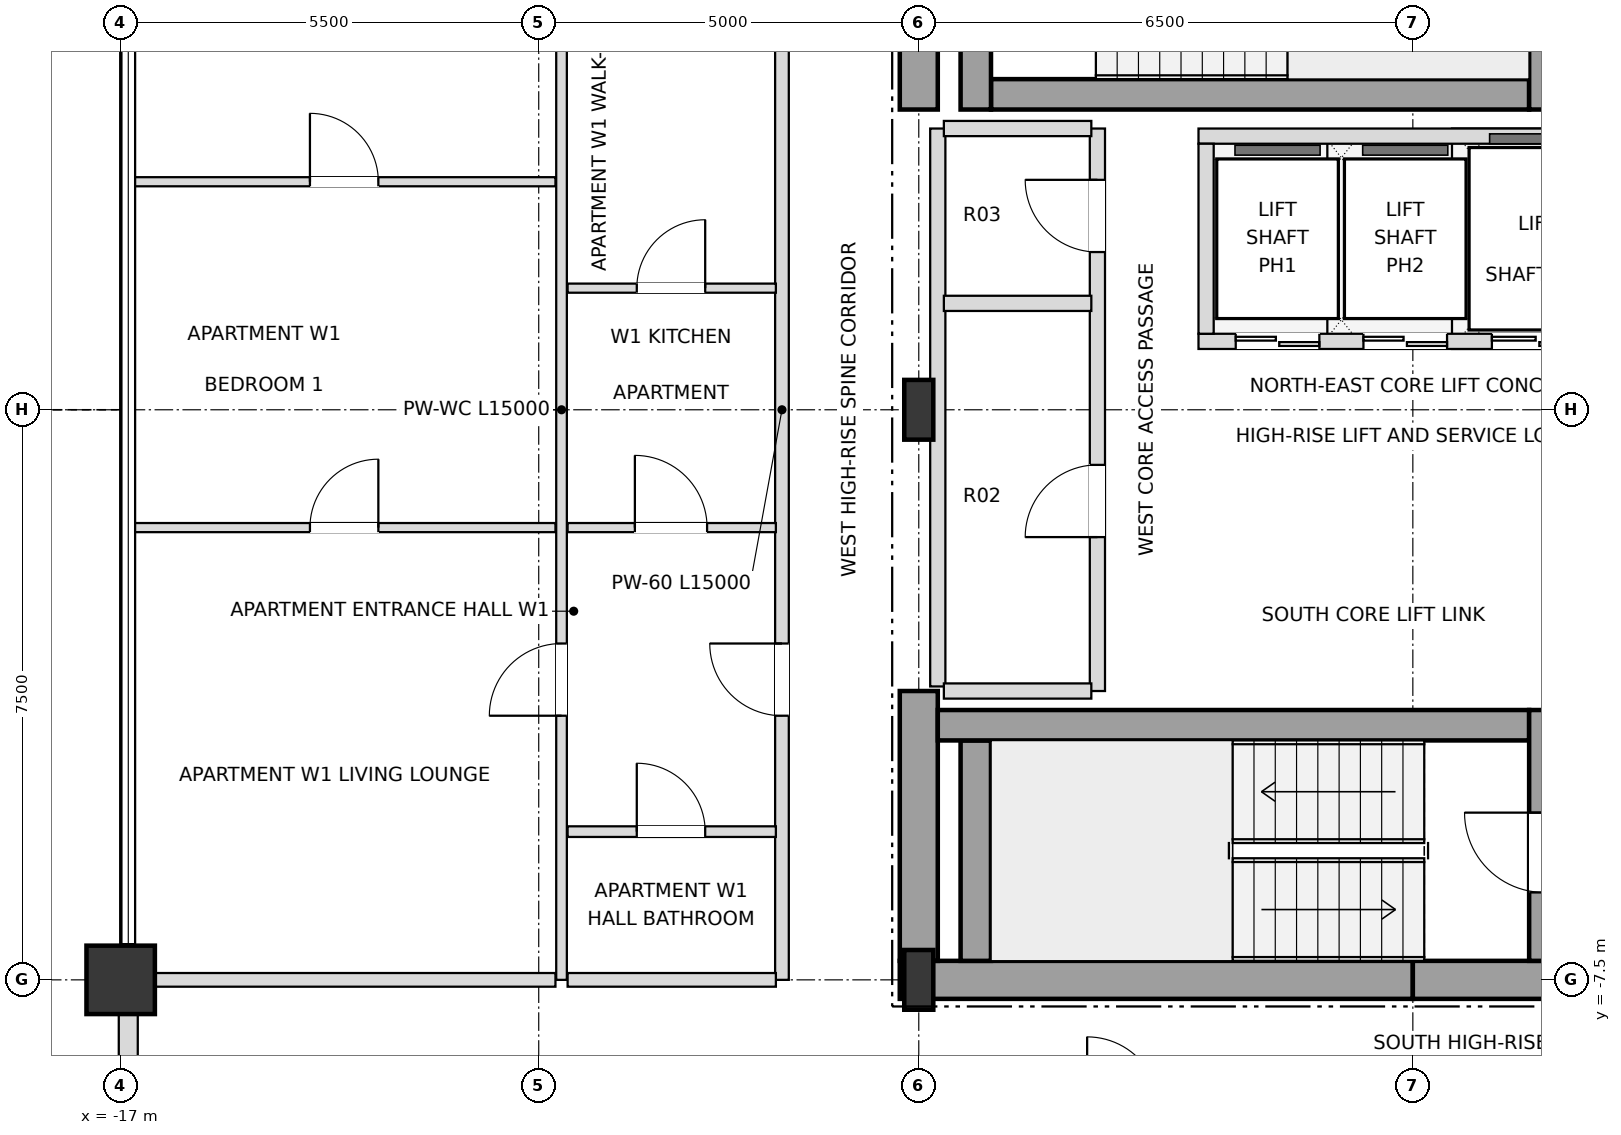
"""IFC4 building model, lengths in metres.
Left out: names, types, materials, properties, quantities, classifications, styles, units other than length and angle.
Written with IfcOpenShell. Run it as: python <this file> out.ifc"""

import sys

from ifc_helpers import new_model, si_unit, direction, frame, frame_2d, origin, origin_2d, place, context, subcontext, project, spatial, rectangle, i_section, extrude, element, fill, save


model = new_model("IFC4")
c1 = context("Model", 3, precision=1e-05, world=origin(), true_north=direction((0.0, 1.0)))
c2 = subcontext(c1, "Body", "Model", "MODEL_VIEW")
j1 = project(units=[si_unit("LENGTHUNIT", "METRE"), si_unit("PLANEANGLEUNIT", "RADIAN")], contexts=[c1])
p1 = place(None, origin())
s1 = spatial("IfcSite", under=j1, at=p1, CompositionType="ELEMENT")
p2 = place(p1, origin())
s2 = spatial("IfcBuilding", under=s1, at=p2, CompositionType="ELEMENT")
p3 = place(p2, frame((0.0, 0.0, 251.1)))
s3 = spatial("IfcBuildingStorey", under=s2, at=p3, CompositionType="ELEMENT", Elevation=251.1)
for number, where, z_axis, x_axis in (
    (1, (-6.5, -7.5, 0.0), (0.0, 0.0, 1.0), (1.0, 0.0, 0.0)),
    (2, (-6.5, 0.0, 0.0), (0.0, 0.0, 1.0), (1.0, 0.0, 0.0)),
):
    element("IfcColumn", number, at=place(p3, frame(where, z_axis=z_axis, x_axis=x_axis)), inside=s3, PredefinedType="COLUMN", context=c2, shape_type="SweptSolid", body=[
        extrude(i_section(OverallWidth=0.382, OverallDepth=0.786, WebThickness=0.02, FlangeThickness=0.033, at=origin_2d()), origin(), (0.0, 0.0, 1.0), 3.6),
    ])
p4 = place(p3, frame((-17.0, -7.5, 0.0), z_axis=(0.0, 0.0, 1.0), x_axis=(1.0, 0.0, 0.0)))
e3 = element("IfcColumn", 3, at=p4, inside=s3, PredefinedType="USERDEFINED", context=c2, shape_type="SweptSolid", body=[
    extrude(rectangle(XDim=0.9, YDim=0.9, at=origin_2d()), origin(), (0.0, 0.0, 1.0), 3.6),
])
p5 = place(p3, frame((-16.9, -7.945, 0.0), z_axis=(0.0, 0.0, 1.0), x_axis=(0.0, -1.0, 0.0)))
e4 = element("IfcWall", 4, at=p5, inside=s3, PredefinedType="SOLIDWALL", context=c2, shape_type="SweptSolid", body=[
    extrude(rectangle(XDim=4.61, YDim=0.25, at=frame_2d((2.305, 0.0))), origin(), (0.0, 0.0, 1.0), 2.748),
])
p6 = place(p5, frame((1.405, 0.0, 0.72)))
e5 = element("IfcOpeningElement", 5, at=p6, cuts=e4, PredefinedType="OPENING", context=c2, shape_type="SweptSolid", body=[
    extrude(rectangle(XDim=1.8, YDim=1.68, at=frame_2d((0.9, 0.84))), frame((0.0, 0.135, 0.0), z_axis=(0.0, -1.0, 0.0), x_axis=(1.0, 0.0, 0.0)), (0.0, 0.0, 1.0), 0.27),
])
for number, where, z_axis, x_axis in (
    (6, (-6.75, -7.5, 0.0), (0.0, 0.0, 1.0), (1.0, 0.0, 0.0)),
    (7, (0.0, -7.5, 0.0), (0.0, 0.0, 1.0), (1.0, 0.0, 0.0)),
):
    element("IfcWall", number, at=place(p3, frame(where, z_axis=z_axis, x_axis=x_axis)), inside=s3, PredefinedType="SHEAR", context=c2, shape_type="SweptSolid", body=[
        extrude(rectangle(XDim=6.75, YDim=0.5, at=frame_2d((3.375, 0.0))), origin(), (0.0, 0.0, 1.0), 3.38),
    ])
p7 = place(p3, frame((-6.5, -7.25, 0.0), z_axis=(0.0, 0.0, 1.0), x_axis=(0.0, 1.0, 0.0)))
e8 = element("IfcWall", 8, at=p7, inside=s3, PredefinedType="SHEAR", context=c2, shape_type="SweptSolid", body=[
    extrude(rectangle(XDim=3.55, YDim=0.5, at=frame_2d((1.775, 0.0))), origin(), (0.0, 0.0, 1.0), 3.38),
])
p8 = place(p3, frame((-6.5, 3.95, 0.0), z_axis=(0.0, 0.0, 1.0), x_axis=(0.0, 1.0, 0.0)))
e9 = element("IfcWall", 9, at=p8, inside=s3, PredefinedType="SHEAR", context=c2, shape_type="SweptSolid", body=[
    extrude(rectangle(XDim=3.3, YDim=0.5, at=frame_2d((1.65, 0.0))), origin(), (0.0, 0.0, 1.0), 3.38),
])
p9 = place(p3, frame((-5.75, -7.25, 0.0), z_axis=(0.0, 0.0, 1.0), x_axis=(0.0, 1.0, 0.0)))
e10 = element("IfcWall", 10, at=p9, inside=s3, PredefinedType="SHEAR", context=c2, shape_type="SweptSolid", body=[
    extrude(rectangle(XDim=2.9, YDim=0.4, at=frame_2d((1.45, 0.0))), origin(), (0.0, 0.0, 1.0), 3.38),
])
p10 = place(p3, frame((-6.25, -4.15, 0.0), z_axis=(0.0, 0.0, 1.0), x_axis=(1.0, 0.0, 0.0)))
e11 = element("IfcWall", 11, at=p10, inside=s3, PredefinedType="SHEAR", context=c2, shape_type="SweptSolid", body=[
    extrude(rectangle(XDim=7.78, YDim=0.4, at=frame_2d((3.89, 0.0))), origin(), (0.0, 0.0, 1.0), 3.38),
])
p11 = place(p3, frame((1.73, -7.25, 0.0), z_axis=(0.0, 0.0, 1.0), x_axis=(0.0, 1.0, 0.0)))
e12 = element("IfcWall", 12, at=p11, inside=s3, PredefinedType="SHEAR", context=c2, shape_type="SweptSolid", body=[
    extrude(rectangle(XDim=3.3, YDim=0.4, at=frame_2d((1.65, 0.0))), origin(), (0.0, 0.0, 1.0), 3.38),
])
p12 = place(p11, frame((0.9, 0.0, 0.0)))
e13 = element("IfcOpeningElement", 13, at=p12, cuts=e12, PredefinedType="OPENING", context=c2, shape_type="SweptSolid", body=[
    extrude(rectangle(XDim=1.05, YDim=2.15, at=frame_2d((0.525, 1.075))), frame((0.0, 0.21, 0.0), z_axis=(0.0, -1.0, 0.0), x_axis=(1.0, 0.0, 0.0)), (0.0, 0.0, 1.0), 0.42),
])
p13 = place(p3, frame((-5.55, 4.15, 0.0), z_axis=(0.0, 0.0, 1.0), x_axis=(1.0, 0.0, 0.0)))
e14 = element("IfcWall", 14, at=p13, inside=s3, PredefinedType="SHEAR", context=c2, shape_type="SweptSolid", body=[
    extrude(rectangle(XDim=7.08, YDim=0.4, at=frame_2d((3.54, 0.0))), origin(), (0.0, 0.0, 1.0), 3.38),
])
for number, where, z_axis, x_axis in (
    (15, (1.73, 3.95, 0.0), (0.0, 0.0, 1.0), (0.0, 1.0, 0.0)),
    (16, (-5.75, 3.95, 0.0), (0.0, 0.0, 1.0), (0.0, 1.0, 0.0)),
):
    element("IfcWall", number, at=place(p3, frame(where, z_axis=z_axis, x_axis=x_axis)), inside=s3, PredefinedType="SHEAR", context=c2, shape_type="SweptSolid", body=[
        extrude(rectangle(XDim=3.3, YDim=0.4, at=frame_2d((1.65, 0.0))), origin(), (0.0, 0.0, 1.0), 3.38),
    ])
p14 = place(p3, frame((-2.82, 0.9, 0.0), z_axis=(0.0, 0.0, 1.0), x_axis=(1.0, 0.0, 0.0)))
e17 = element("IfcWall", 17, at=p14, inside=s3, PredefinedType="SOLIDWALL", context=c2, shape_type="SweptSolid", body=[
    extrude(rectangle(XDim=5.58, YDim=0.2, at=frame_2d((2.79, 0.0))), origin(), (0.0, 0.0, 1.0), 3.38),
])
p15 = place(p14, frame((0.49, 0.0, 0.0)))
e18 = element("IfcOpeningElement", 18, at=p15, cuts=e17, PredefinedType="OPENING", context=c2, shape_type="SweptSolid", body=[
    extrude(rectangle(XDim=1.1, YDim=2.15, at=frame_2d((0.55, 1.075))), frame((0.0, 0.11, 0.0), z_axis=(0.0, -1.0, 0.0), x_axis=(1.0, 0.0, 0.0)), (0.0, 0.0, 1.0), 0.22),
])
p16 = place(p14, frame((2.17, 0.0, 0.0)))
e19 = element("IfcOpeningElement", 19, at=p16, cuts=e17, PredefinedType="OPENING", context=c2, shape_type="SweptSolid", body=[
    extrude(rectangle(XDim=1.1, YDim=2.15, at=frame_2d((0.55, 1.075))), frame((0.0, 0.11, 0.0), z_axis=(0.0, -1.0, 0.0), x_axis=(1.0, 0.0, 0.0)), (0.0, 0.0, 1.0), 0.22),
])
p17 = place(p14, frame((3.86, 0.0, 0.0)))
e20 = element("IfcOpeningElement", 20, at=p17, cuts=e17, PredefinedType="OPENING", context=c2, shape_type="SweptSolid", body=[
    extrude(rectangle(XDim=1.2, YDim=2.2, at=frame_2d((0.6, 1.1))), frame((0.0, 0.11, 0.0), z_axis=(0.0, -1.0, 0.0), x_axis=(1.0, 0.0, 0.0)), (0.0, 0.0, 1.0), 0.22),
])
p18 = place(p3, frame((-2.82, 3.6, 0.0), z_axis=(0.0, 0.0, 1.0), x_axis=(1.0, 0.0, 0.0)))
e21 = element("IfcWall", 21, at=p18, inside=s3, PredefinedType="SOLIDWALL", context=c2, shape_type="SweptSolid", body=[
    extrude(rectangle(XDim=5.58, YDim=0.2, at=frame_2d((2.79, 0.0))), origin(), (0.0, 0.0, 1.0), 3.38),
])
p19 = place(p3, frame((-2.72, 1.0, 0.0), z_axis=(0.0, 0.0, 1.0), x_axis=(0.0, 1.0, 0.0)))
e22 = element("IfcWall", 22, at=p19, inside=s3, PredefinedType="SOLIDWALL", context=c2, shape_type="SweptSolid", body=[
    extrude(rectangle(XDim=2.5, YDim=0.2, at=frame_2d((1.25, 0.0))), origin(), (0.0, 0.0, 1.0), 3.38),
])
p20 = place(p3, frame((-11.2, -7.5, 0.0), z_axis=(0.0, 0.0, 1.0), x_axis=(0.0, 1.0, 0.0)))
e23 = element("IfcWall", 23, at=p20, inside=s3, PredefinedType="PARTITIONING", context=c2, shape_type="SweptSolid", body=[
    extrude(rectangle(XDim=15.0, YDim=0.14, at=frame_2d((7.5, 0.0))), origin(), (0.0, 0.0, 1.0), 3.38),
])
p21 = place(p20, frame((3.475, 0.0, 0.0)))
e24 = element("IfcOpeningElement", 24, at=p21, cuts=e23, PredefinedType="OPENING", context=c2, shape_type="SweptSolid", body=[
    extrude(rectangle(XDim=0.95, YDim=2.1, at=frame_2d((0.475, 1.05))), frame((0.0, 0.08, 0.0), z_axis=(0.0, -1.0, 0.0), x_axis=(1.0, 0.0, 0.0)), (0.0, 0.0, 1.0), 0.16),
])
p22 = place(p3, frame((-8.3, -7.5, 0.0), z_axis=(0.0, 0.0, 1.0), x_axis=(0.0, 1.0, 0.0)))
e25 = element("IfcWall", 25, at=p22, inside=s3, PredefinedType="PARTITIONING", context=c2, shape_type="SweptSolid", body=[
    extrude(rectangle(XDim=15.0, YDim=0.18, at=frame_2d((7.5, 0.0))), origin(), (0.0, 0.0, 1.0), 3.38),
])
p23 = place(p22, frame((3.475, 0.0, 0.0)))
e26 = element("IfcOpeningElement", 26, at=p23, cuts=e25, PredefinedType="OPENING", context=c2, shape_type="SweptSolid", body=[
    extrude(rectangle(XDim=0.95, YDim=2.15, at=frame_2d((0.475, 1.075))), frame((0.0, 0.1, 0.0), z_axis=(0.0, -1.0, 0.0), x_axis=(1.0, 0.0, 0.0)), (0.0, 0.0, 1.0), 0.2),
])
p24 = place(p3, frame((-6.25, -3.64, 0.0), z_axis=(0.0, 0.0, 1.0), x_axis=(0.0, 1.0, 0.0)))
e27 = element("IfcWall", 27, at=p24, inside=s3, PredefinedType="SOLIDWALL", context=c2, shape_type="SweptSolid", body=[
    extrude(rectangle(XDim=7.34, YDim=0.2, at=frame_2d((3.67, 0.0))), origin(), (0.0, 0.0, 1.0), 3.38),
])
p25 = place(p3, frame((-4.15, -3.7, 0.0), z_axis=(0.0, 0.0, 1.0), x_axis=(0.0, 1.0, 0.0)))
e28 = element("IfcWall", 28, at=p25, inside=s3, PredefinedType="SOLIDWALL", context=c2, shape_type="SweptSolid", body=[
    extrude(rectangle(XDim=7.4, YDim=0.2, at=frame_2d((3.7, 0.0))), origin(), (0.0, 0.0, 1.0), 3.38),
])
p26 = place(p25, frame((2.025, 0.0, 0.0)))
e29 = element("IfcOpeningElement", 29, at=p26, cuts=e28, PredefinedType="OPENING", context=c2, shape_type="SweptSolid", body=[
    extrude(rectangle(XDim=0.95, YDim=2.15, at=frame_2d((0.475, 1.075))), frame((0.0, 0.11, 0.0), z_axis=(0.0, -1.0, 0.0), x_axis=(1.0, 0.0, 0.0)), (0.0, 0.0, 1.0), 0.22),
])
p27 = place(p25, frame((5.775, 0.0, 0.0)))
e30 = element("IfcOpeningElement", 30, at=p27, cuts=e28, PredefinedType="OPENING", context=c2, shape_type="SweptSolid", body=[
    extrude(rectangle(XDim=0.95, YDim=2.15, at=frame_2d((0.475, 1.075))), frame((0.0, 0.11, 0.0), z_axis=(0.0, -1.0, 0.0), x_axis=(1.0, 0.0, 0.0)), (0.0, 0.0, 1.0), 0.22),
])
p28 = place(p3, frame((-16.9, -7.5, 0.0), z_axis=(0.0, 0.0, 1.0), x_axis=(1.0, 0.0, 0.0)))
e31 = element("IfcWall", 31, at=p28, inside=s3, PredefinedType="PARTITIONING", context=c2, shape_type="SweptSolid", body=[
    extrude(rectangle(XDim=5.62, YDim=0.18, at=frame_2d((2.81, 0.0))), origin(), (0.0, 0.0, 1.0), 2.826),
])
p29 = place(p3, frame((-11.12, -7.5, 0.0), z_axis=(0.0, 0.0, 1.0), x_axis=(1.0, 0.0, 0.0)))
e32 = element("IfcWall", 32, at=p29, inside=s3, PredefinedType="PARTITIONING", context=c2, shape_type="SweptSolid", body=[
    extrude(rectangle(XDim=2.74, YDim=0.18, at=frame_2d((1.37, 0.0))), origin(), (0.0, 0.0, 1.0), 2.826),
])
p30 = place(p3, frame((-11.12, -5.55, 0.0), z_axis=(0.0, 0.0, 1.0), x_axis=(1.0, 0.0, 0.0)))
e33 = element("IfcWall", 33, at=p30, inside=s3, PredefinedType="PARTITIONING", context=c2, shape_type="SweptSolid", body=[
    extrude(rectangle(XDim=2.74, YDim=0.14, at=frame_2d((1.37, 0.0))), origin(), (0.0, 0.0, 1.0), 3.38),
])
p31 = place(p30, frame((0.91, 0.0, 0.0)))
e34 = element("IfcOpeningElement", 34, at=p31, cuts=e33, PredefinedType="OPENING", context=c2, shape_type="SweptSolid", body=[
    extrude(rectangle(XDim=0.9, YDim=2.1, at=frame_2d((0.45, 1.05))), frame((0.0, 0.08, 0.0), z_axis=(0.0, -1.0, 0.0), x_axis=(1.0, 0.0, 0.0)), (0.0, 0.0, 1.0), 0.16),
])
p32 = place(p3, frame((-6.17, -3.7, 0.0), z_axis=(0.0, 0.0, 1.0), x_axis=(1.0, 0.0, 0.0)))
e35 = element("IfcWall", 35, at=p32, inside=s3, PredefinedType="SOLIDWALL", context=c2, shape_type="SweptSolid", body=[
    extrude(rectangle(XDim=1.94, YDim=0.2, at=frame_2d((0.97, 0.0))), origin(), (0.0, 0.0, 1.0), 3.38),
])
p33 = place(p3, frame((-16.82, -1.55, 0.0), z_axis=(0.0, 0.0, 1.0), x_axis=(1.0, 0.0, 0.0)))
e36 = element("IfcWall", 36, at=p33, inside=s3, PredefinedType="PARTITIONING", context=c2, shape_type="SweptSolid", body=[
    extrude(rectangle(XDim=5.54, YDim=0.12, at=frame_2d((2.77, 0.0))), origin(), (0.0, 0.0, 1.0), 3.018),
])
p34 = place(p33, frame((2.31, 0.0, 0.0)))
e37 = element("IfcOpeningElement", 37, at=p34, cuts=e36, PredefinedType="OPENING", context=c2, shape_type="SweptSolid", body=[
    extrude(rectangle(XDim=0.9, YDim=2.1, at=frame_2d((0.45, 1.05))), frame((0.0, 0.07, 0.0), z_axis=(0.0, -1.0, 0.0), x_axis=(1.0, 0.0, 0.0)), (0.0, 0.0, 1.0), 0.14),
])
p35 = place(p3, frame((-11.12, -1.55, 0.0), z_axis=(0.0, 0.0, 1.0), x_axis=(1.0, 0.0, 0.0)))
e38 = element("IfcWall", 38, at=p35, inside=s3, PredefinedType="PARTITIONING", context=c2, shape_type="SweptSolid", body=[
    extrude(rectangle(XDim=2.74, YDim=0.12, at=frame_2d((1.37, 0.0))), origin(), (0.0, 0.0, 1.0), 3.38),
])
p36 = place(p35, frame((0.885, 0.0, 0.0)))
e39 = element("IfcOpeningElement", 39, at=p36, cuts=e38, PredefinedType="OPENING", context=c2, shape_type="SweptSolid", body=[
    extrude(rectangle(XDim=0.95, YDim=2.1, at=frame_2d((0.475, 1.05))), frame((0.0, 0.07, 0.0), z_axis=(0.0, -1.0, 0.0), x_axis=(1.0, 0.0, 0.0)), (0.0, 0.0, 1.0), 0.14),
])
p37 = place(p3, frame((-6.17, 1.4, 0.0), z_axis=(0.0, 0.0, 1.0), x_axis=(1.0, 0.0, 0.0)))
e40 = element("IfcWall", 40, at=p37, inside=s3, PredefinedType="SOLIDWALL", context=c2, shape_type="SweptSolid", body=[
    extrude(rectangle(XDim=1.94, YDim=0.2, at=frame_2d((0.97, 0.0))), origin(), (0.0, 0.0, 1.0), 3.38),
])
p38 = place(p3, frame((-11.12, 1.6, 0.0), z_axis=(0.0, 0.0, 1.0), x_axis=(1.0, 0.0, 0.0)))
e41 = element("IfcWall", 41, at=p38, inside=s3, PredefinedType="PARTITIONING", context=c2, shape_type="SweptSolid", body=[
    extrude(rectangle(XDim=2.74, YDim=0.12, at=frame_2d((1.37, 0.0))), origin(), (0.0, 0.0, 1.0), 3.38),
])
p39 = place(p38, frame((0.91, 0.0, 0.0)))
e42 = element("IfcOpeningElement", 42, at=p39, cuts=e41, PredefinedType="OPENING", context=c2, shape_type="SweptSolid", body=[
    extrude(rectangle(XDim=0.9, YDim=2.1, at=frame_2d((0.45, 1.05))), frame((0.0, 0.07, 0.0), z_axis=(0.0, -1.0, 0.0), x_axis=(1.0, 0.0, 0.0)), (0.0, 0.0, 1.0), 0.14),
])
p40 = place(p3, frame((-16.82, 3.0, 0.0), z_axis=(0.0, 0.0, 1.0), x_axis=(1.0, 0.0, 0.0)))
e43 = element("IfcWall", 43, at=p40, inside=s3, PredefinedType="PARTITIONING", context=c2, shape_type="SweptSolid", body=[
    extrude(rectangle(XDim=5.54, YDim=0.12, at=frame_2d((2.77, 0.0))), origin(), (0.0, 0.0, 1.0), 3.018),
])
p41 = place(p40, frame((2.31, 0.0, 0.0)))
e44 = element("IfcOpeningElement", 44, at=p41, cuts=e43, PredefinedType="OPENING", context=c2, shape_type="SweptSolid", body=[
    extrude(rectangle(XDim=0.9, YDim=2.1, at=frame_2d((0.45, 1.05))), frame((0.0, 0.07, 0.0), z_axis=(0.0, -1.0, 0.0), x_axis=(1.0, 0.0, 0.0)), (0.0, 0.0, 1.0), 0.14),
])
p42 = place(p3, frame((-6.17, 3.7, 0.0), z_axis=(0.0, 0.0, 1.0), x_axis=(1.0, 0.0, 0.0)))
e45 = element("IfcWall", 45, at=p42, inside=s3, PredefinedType="SOLIDWALL", context=c2, shape_type="SweptSolid", body=[
    extrude(rectangle(XDim=1.94, YDim=0.2, at=frame_2d((0.97, 0.0))), origin(), (0.0, 0.0, 1.0), 3.38),
])
p43 = place(p15, origin())
e46 = element("IfcDoor", 46, at=p43, inside=s3, OperationType="DOUBLE_DOOR_SLIDING", PredefinedType="DOOR", context=c2, shape_type="SweptSolid", body=[
    extrude(rectangle(XDim=1.1, YDim=2.15, at=frame_2d((0.55, 1.075))), frame((0.0, 0.025, 0.0), z_axis=(0.0, -1.0, 0.0), x_axis=(1.0, 0.0, 0.0)), (0.0, 0.0, 1.0), 0.05),
])
fill(e18, e46)
p44 = place(p16, origin())
e47 = element("IfcDoor", 47, at=p44, inside=s3, OperationType="DOUBLE_DOOR_SLIDING", PredefinedType="DOOR", context=c2, shape_type="SweptSolid", body=[
    extrude(rectangle(XDim=1.1, YDim=2.15, at=frame_2d((0.55, 1.075))), frame((0.0, 0.025, 0.0), z_axis=(0.0, -1.0, 0.0), x_axis=(1.0, 0.0, 0.0)), (0.0, 0.0, 1.0), 0.05),
])
fill(e19, e47)
p45 = place(p17, origin())
e48 = element("IfcDoor", 48, at=p45, inside=s3, OperationType="DOUBLE_DOOR_SLIDING", PredefinedType="DOOR", context=c2, shape_type="SweptSolid", body=[
    extrude(rectangle(XDim=1.2, YDim=2.2, at=frame_2d((0.6, 1.1))), frame((0.0, 0.025, 0.0), z_axis=(0.0, -1.0, 0.0), x_axis=(1.0, 0.0, 0.0)), (0.0, 0.0, 1.0), 0.05),
])
fill(e20, e48)
p46 = place(p26, origin())
e49 = element("IfcDoor", 49, at=p46, inside=s3, OperationType="SINGLE_SWING_LEFT", PredefinedType="DOOR", context=c2, shape_type="SweptSolid", body=[
    extrude(rectangle(XDim=0.95, YDim=2.15, at=frame_2d((0.475, 1.075))), frame((0.0, 0.025, 0.0), z_axis=(0.0, -1.0, 0.0), x_axis=(1.0, 0.0, 0.0)), (0.0, 0.0, 1.0), 0.05),
])
fill(e29, e49)
p47 = place(p27, origin())
e50 = element("IfcDoor", 50, at=p47, inside=s3, OperationType="SINGLE_SWING_RIGHT", PredefinedType="DOOR", context=c2, shape_type="SweptSolid", body=[
    extrude(rectangle(XDim=0.95, YDim=2.15, at=frame_2d((0.475, 1.075))), frame((0.0, 0.025, 0.0), z_axis=(0.0, -1.0, 0.0), x_axis=(1.0, 0.0, 0.0)), (0.0, 0.0, 1.0), 0.05),
])
fill(e30, e50)
p48 = place(p31, origin())
e51 = element("IfcDoor", 51, at=p48, inside=s3, OperationType="SINGLE_SWING_LEFT", PredefinedType="DOOR", context=c2, shape_type="SweptSolid", body=[
    extrude(rectangle(XDim=0.9, YDim=2.1, at=frame_2d((0.45, 1.05))), frame((0.0, 0.025, 0.0), z_axis=(0.0, -1.0, 0.0), x_axis=(1.0, 0.0, 0.0)), (0.0, 0.0, 1.0), 0.05),
])
fill(e34, e51)
p49 = place(p23, origin())
e52 = element("IfcDoor", 52, at=p49, inside=s3, OperationType="SINGLE_SWING_RIGHT", PredefinedType="DOOR", context=c2, shape_type="SweptSolid", body=[
    extrude(rectangle(XDim=0.95, YDim=2.15, at=frame_2d((0.475, 1.075))), frame((0.0, 0.025, 0.0), z_axis=(0.0, -1.0, 0.0), x_axis=(1.0, 0.0, 0.0)), (0.0, 0.0, 1.0), 0.05),
])
fill(e26, e52)
p50 = place(p36, origin())
e53 = element("IfcDoor", 53, at=p50, inside=s3, OperationType="SINGLE_SWING_LEFT", PredefinedType="DOOR", context=c2, shape_type="SweptSolid", body=[
    extrude(rectangle(XDim=0.95, YDim=2.1, at=frame_2d((0.475, 1.05))), frame((0.0, 0.025, 0.0), z_axis=(0.0, -1.0, 0.0), x_axis=(1.0, 0.0, 0.0)), (0.0, 0.0, 1.0), 0.05),
])
fill(e39, e53)
p51 = place(p39, origin())
e54 = element("IfcDoor", 54, at=p51, inside=s3, OperationType="SINGLE_SWING_RIGHT", PredefinedType="DOOR", context=c2, shape_type="SweptSolid", body=[
    extrude(rectangle(XDim=0.9, YDim=2.1, at=frame_2d((0.45, 1.05))), frame((0.0, 0.025, 0.0), z_axis=(0.0, -1.0, 0.0), x_axis=(1.0, 0.0, 0.0)), (0.0, 0.0, 1.0), 0.05),
])
fill(e42, e54)
p52 = place(p21, origin())
e55 = element("IfcDoor", 55, at=p52, inside=s3, OperationType="SINGLE_SWING_LEFT", PredefinedType="DOOR", context=c2, shape_type="SweptSolid", body=[
    extrude(rectangle(XDim=0.95, YDim=2.1, at=frame_2d((0.475, 1.05))), frame((0.0, 0.025, 0.0), z_axis=(0.0, -1.0, 0.0), x_axis=(1.0, 0.0, 0.0)), (0.0, 0.0, 1.0), 0.05),
])
fill(e24, e55)
p53 = place(p34, origin())
e56 = element("IfcDoor", 56, at=p53, inside=s3, OperationType="SINGLE_SWING_RIGHT", PredefinedType="DOOR", context=c2, shape_type="SweptSolid", body=[
    extrude(rectangle(XDim=0.9, YDim=2.1, at=frame_2d((0.45, 1.05))), frame((0.0, 0.025, 0.0), z_axis=(0.0, -1.0, 0.0), x_axis=(1.0, 0.0, 0.0)), (0.0, 0.0, 1.0), 0.05),
])
fill(e37, e56)
p54 = place(p41, origin())
e57 = element("IfcDoor", 57, at=p54, inside=s3, OperationType="SINGLE_SWING_LEFT", PredefinedType="DOOR", context=c2, shape_type="SweptSolid", body=[
    extrude(rectangle(XDim=0.9, YDim=2.1, at=frame_2d((0.45, 1.05))), frame((0.0, 0.025, 0.0), z_axis=(0.0, -1.0, 0.0), x_axis=(1.0, 0.0, 0.0)), (0.0, 0.0, 1.0), 0.05),
])
fill(e44, e57)
save(model, sys.argv[1])
